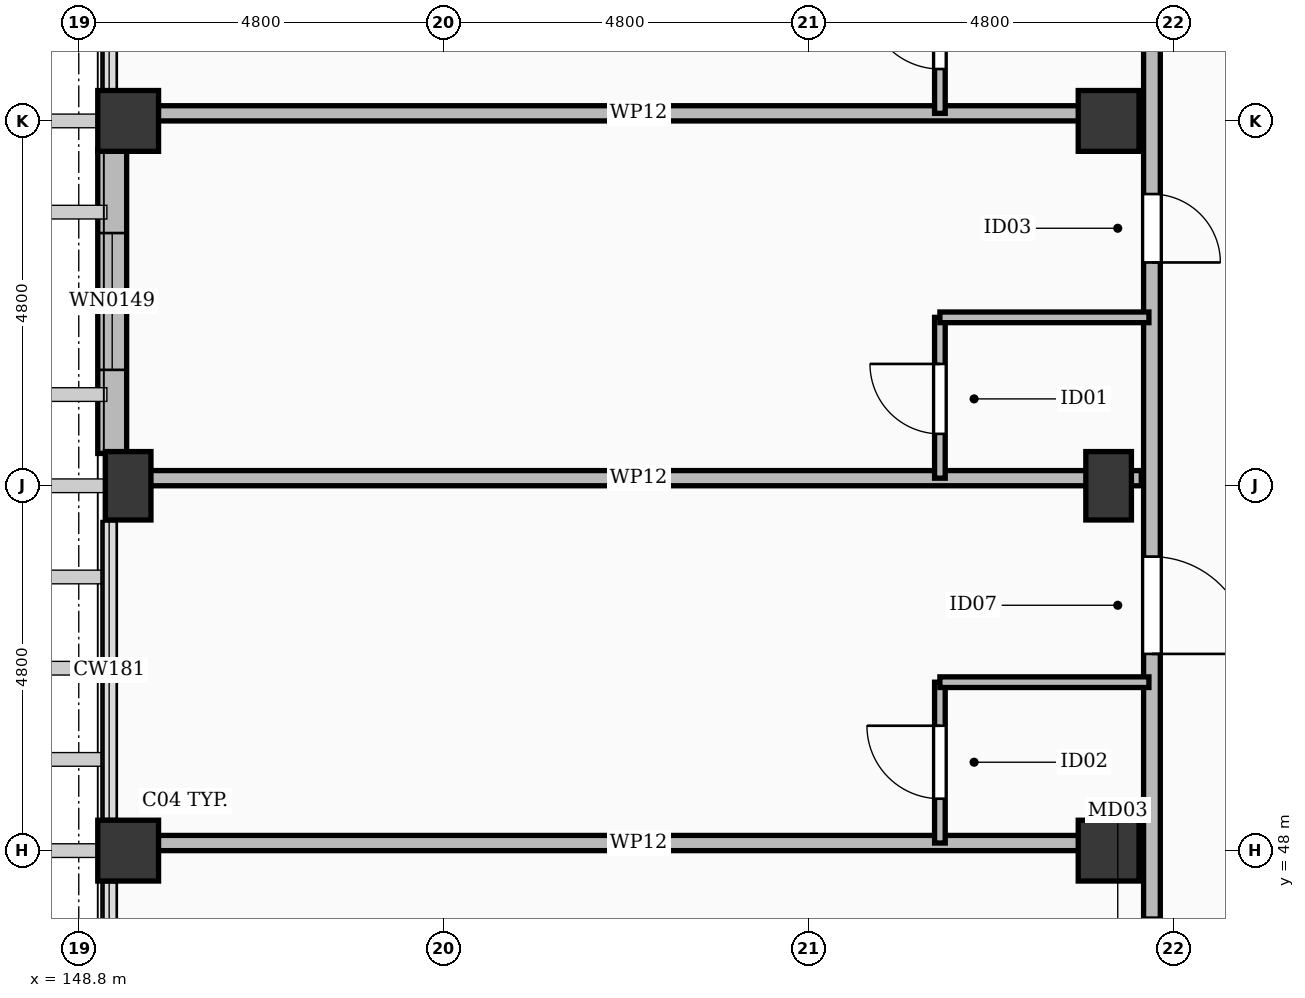
"""IFC4 building model, lengths in metres.
Left out: names, types, materials, properties, quantities, classifications, styles, units other than length and angle.
Written with IfcOpenShell. Run it as: python <this file> out.ifc"""

import sys

from ifc_helpers import new_model, si_unit, direction, frame, frame_2d, origin, origin_2d, place, context, subcontext, project, spatial, rectangle, extrude, element, fill, save


model = new_model("IFC4")
c1 = context("Model", 3, precision=1e-05, world=origin(), true_north=direction((0.0, 1.0)))
c2 = subcontext(c1, "Body", "Model", "MODEL_VIEW")
j1 = project(units=[si_unit("LENGTHUNIT", "METRE"), si_unit("PLANEANGLEUNIT", "RADIAN")], contexts=[c1])
p1 = place(None, origin())
s1 = spatial("IfcSite", under=j1, at=p1, CompositionType="ELEMENT")
p2 = place(p1, origin())
s2 = spatial("IfcBuilding", under=s1, at=p2, CompositionType="ELEMENT")
p3 = place(p2, frame((0.0, 0.0, 21.0)))
s3 = spatial("IfcBuildingStorey", under=s2, at=p3, CompositionType="ELEMENT", Elevation=21.0)
for number, where, z_axis, x_axis in (
    (1, (149.45, 48.0, 0.0), (0.0, 0.0, 1.0), (1.0, 0.0, 0.0)),
    (2, (149.45, 57.6, 0.0), (0.0, 0.0, 1.0), (1.0, 0.0, 0.0)),
    (3, (162.35, 48.0, 0.0), (0.0, 0.0, 1.0), (1.0, 0.0, 0.0)),
    (4, (162.35, 57.6, 0.0), (0.0, 0.0, 1.0), (1.0, 0.0, 0.0)),
):
    element("IfcColumn", number, at=place(p3, frame(where, z_axis=z_axis, x_axis=x_axis)), inside=s3, PredefinedType="COLUMN", context=c2, shape_type="SweptSolid", body=[
        extrude(rectangle(XDim=0.8, YDim=0.8, at=origin_2d()), origin(), (0.0, 0.0, 1.0), 3.6),
    ])
for number, where, z_axis, x_axis in (
    (5, (149.45, 52.8, -0.26), (0.0, 0.0, 1.0), (1.0, 0.0, 0.0)),
    (6, (162.35, 52.8, -0.26), (0.0, 0.0, 1.0), (1.0, 0.0, 0.0)),
):
    element("IfcColumn", number, at=place(p3, frame(where, z_axis=z_axis, x_axis=x_axis)), inside=s3, PredefinedType="COLUMN", context=c2, shape_type="SweptSolid", body=[
        extrude(rectangle(XDim=0.6, YDim=0.9, at=origin_2d()), origin(), (0.0, 0.0, 1.0), 3.86),
    ])
p4 = place(p3, frame((149.24, 53.225, 0.0), z_axis=(0.0, 0.0, 1.0), x_axis=(0.0, 1.0, 0.0)))
e7 = element("IfcWall", 7, at=p4, inside=s3, PredefinedType="SOLIDWALL", context=c2, shape_type="SweptSolid", body=[
    extrude(rectangle(XDim=4.0, YDim=0.38, at=frame_2d((2.0, 0.0))), origin(), (0.0, 0.0, 1.0), 2.652),
])
p5 = place(p4, frame((1.1, 0.0, 0.55)))
e8 = element("IfcOpeningElement", 8, at=p5, cuts=e7, PredefinedType="OPENING", context=c2, shape_type="SweptSolid", body=[
    extrude(rectangle(XDim=1.8, YDim=1.76, at=frame_2d((0.9, 0.88))), frame((0.0, 0.202, 0.0), z_axis=(0.0, -1.0, 0.0), x_axis=(1.0, 0.0, 0.0)), (0.0, 0.0, 1.0), 0.404),
])
p6 = place(p3, frame((162.92, 19.55, 0.0), z_axis=(0.0, 0.0, 1.0), x_axis=(0.0, 1.0, 0.0)))
e9 = element("IfcWall", 9, at=p6, inside=s3, PredefinedType="PARTITIONING", context=c2, shape_type="SweptSolid", body=[
    extrude(rectangle(XDim=53.65, YDim=0.22, at=frame_2d((26.825, 0.0))), origin(), (0.0, 0.0, 1.0), 2.652),
])
p7 = place(p6, frame((5.15, 0.0, 0.0)))
e10 = element("IfcOpeningElement", 10, at=p7, cuts=e9, PredefinedType="OPENING", context=c2, shape_type="SweptSolid", body=[
    extrude(rectangle(XDim=1.5, YDim=2.3, at=frame_2d((0.75, 1.15))), frame((0.0, 0.122, 0.0), z_axis=(0.0, -1.0, 0.0), x_axis=(1.0, 0.0, 0.0)), (0.0, 0.0, 1.0), 0.244),
])
p8 = place(p6, frame((12.188, 0.0, 0.0)))
e11 = element("IfcOpeningElement", 11, at=p8, cuts=e9, PredefinedType="OPENING", context=c2, shape_type="SweptSolid", body=[
    extrude(rectangle(XDim=1.05, YDim=2.22, at=frame_2d((0.525, 1.11))), frame((0.0, 0.122, 0.0), z_axis=(0.0, -1.0, 0.0), x_axis=(1.0, 0.0, 0.0)), (0.0, 0.0, 1.0), 0.244),
])
p9 = place(p6, frame((16.988, 0.0, 0.0)))
e12 = element("IfcOpeningElement", 12, at=p9, cuts=e9, PredefinedType="OPENING", context=c2, shape_type="SweptSolid", body=[
    extrude(rectangle(XDim=1.02, YDim=2.2, at=frame_2d((0.51, 1.1))), frame((0.0, 0.122, 0.0), z_axis=(0.0, -1.0, 0.0), x_axis=(1.0, 0.0, 0.0)), (0.0, 0.0, 1.0), 0.244),
])
p10 = place(p6, frame((21.788, 0.0, 0.0)))
e13 = element("IfcOpeningElement", 13, at=p10, cuts=e9, PredefinedType="OPENING", context=c2, shape_type="SweptSolid", body=[
    extrude(rectangle(XDim=1.14, YDim=2.26, at=frame_2d((0.57, 1.13))), frame((0.0, 0.122, 0.0), z_axis=(0.0, -1.0, 0.0), x_axis=(1.0, 0.0, 0.0)), (0.0, 0.0, 1.0), 0.244),
])
p11 = place(p6, frame((26.588, 0.0, 0.0)))
e14 = element("IfcOpeningElement", 14, at=p11, cuts=e9, PredefinedType="OPENING", context=c2, shape_type="SweptSolid", body=[
    extrude(rectangle(XDim=0.98, YDim=2.15, at=frame_2d((0.49, 1.075))), frame((0.0, 0.122, 0.0), z_axis=(0.0, -1.0, 0.0), x_axis=(1.0, 0.0, 0.0)), (0.0, 0.0, 1.0), 0.244),
])
p12 = place(p6, frame((31.038, 0.0, 0.0)))
e15 = element("IfcOpeningElement", 15, at=p12, cuts=e9, PredefinedType="OPENING", context=c2, shape_type="SweptSolid", body=[
    extrude(rectangle(XDim=1.28, YDim=2.16, at=frame_2d((0.64, 1.08))), frame((0.0, 0.122, 0.0), z_axis=(0.0, -1.0, 0.0), x_axis=(1.0, 0.0, 0.0)), (0.0, 0.0, 1.0), 0.244),
])
p13 = place(p6, frame((36.188, 0.0, 0.0)))
e16 = element("IfcOpeningElement", 16, at=p13, cuts=e9, PredefinedType="OPENING", context=c2, shape_type="SweptSolid", body=[
    extrude(rectangle(XDim=0.9, YDim=2.08, at=frame_2d((0.45, 1.04))), frame((0.0, 0.122, 0.0), z_axis=(0.0, -1.0, 0.0), x_axis=(1.0, 0.0, 0.0)), (0.0, 0.0, 1.0), 0.244),
])
p14 = place(p6, frame((40.988, 0.0, 0.0)))
e17 = element("IfcOpeningElement", 17, at=p14, cuts=e9, PredefinedType="OPENING", context=c2, shape_type="SweptSolid", body=[
    extrude(rectangle(XDim=1.05, YDim=2.22, at=frame_2d((0.525, 1.11))), frame((0.0, 0.122, 0.0), z_axis=(0.0, -1.0, 0.0), x_axis=(1.0, 0.0, 0.0)), (0.0, 0.0, 1.0), 0.244),
])
p15 = place(p6, frame((45.788, 0.0, 0.0)))
e18 = element("IfcOpeningElement", 18, at=p15, cuts=e9, PredefinedType="OPENING", context=c2, shape_type="SweptSolid", body=[
    extrude(rectangle(XDim=1.02, YDim=2.2, at=frame_2d((0.51, 1.1))), frame((0.0, 0.122, 0.0), z_axis=(0.0, -1.0, 0.0), x_axis=(1.0, 0.0, 0.0)), (0.0, 0.0, 1.0), 0.244),
])
p16 = place(p6, frame((50.588, 0.0, 0.0)))
e19 = element("IfcOpeningElement", 19, at=p16, cuts=e9, PredefinedType="OPENING", context=c2, shape_type="SweptSolid", body=[
    extrude(rectangle(XDim=1.14, YDim=2.26, at=frame_2d((0.57, 1.13))), frame((0.0, 0.122, 0.0), z_axis=(0.0, -1.0, 0.0), x_axis=(1.0, 0.0, 0.0)), (0.0, 0.0, 1.0), 0.244),
])
p17 = place(p3, frame((149.55, 48.1, 0.0), z_axis=(0.0, 0.0, 1.0), x_axis=(1.0, 0.0, 0.0)))
e20 = element("IfcWall", 20, at=p17, inside=s3, PredefinedType="PARTITIONING", context=c2, shape_type="SweptSolid", body=[
    extrude(rectangle(XDim=13.23, YDim=0.2, at=frame_2d((6.615, 0.0))), origin(), (0.0, 0.0, 1.0), 2.652),
])
p18 = place(p3, frame((160.13, 48.1, 0.0), z_axis=(0.0, 0.0, 1.0), x_axis=(0.0, 1.0, 0.0)))
e21 = element("IfcWall", 21, at=p18, inside=s3, PredefinedType="PARTITIONING", context=c2, shape_type="SweptSolid", body=[
    extrude(rectangle(XDim=2.116, YDim=0.14, at=frame_2d((1.058, 0.0))), origin(), (0.0, 0.0, 1.0), 2.652),
])
p19 = place(p18, frame((0.583, 0.0, 0.0)))
e22 = element("IfcOpeningElement", 22, at=p19, cuts=e21, PredefinedType="OPENING", context=c2, shape_type="SweptSolid", body=[
    extrude(rectangle(XDim=0.96, YDim=2.12, at=frame_2d((0.48, 1.06))), frame((0.0, 0.082, 0.0), z_axis=(0.0, -1.0, 0.0), x_axis=(1.0, 0.0, 0.0)), (0.0, 0.0, 1.0), 0.164),
])
p20 = place(p3, frame((160.13, 50.216, 0.0), z_axis=(0.0, 0.0, 1.0), x_axis=(1.0, 0.0, 0.0)))
e23 = element("IfcWall", 23, at=p20, inside=s3, PredefinedType="PARTITIONING", context=c2, shape_type="SweptSolid", body=[
    extrude(rectangle(XDim=2.75, YDim=0.14, at=frame_2d((1.375, 0.0))), origin(), (0.0, 0.0, 1.0), 2.652),
])
p21 = place(p3, frame((149.55, 52.9, 0.0), z_axis=(0.0, 0.0, 1.0), x_axis=(1.0, 0.0, 0.0)))
e24 = element("IfcWall", 24, at=p21, inside=s3, PredefinedType="PARTITIONING", context=c2, shape_type="SweptSolid", body=[
    extrude(rectangle(XDim=13.23, YDim=0.2, at=frame_2d((6.615, 0.0))), origin(), (0.0, 0.0, 1.0), 2.652),
])
p22 = place(p3, frame((160.13, 52.9, 0.0), z_axis=(0.0, 0.0, 1.0), x_axis=(0.0, 1.0, 0.0)))
e25 = element("IfcWall", 25, at=p22, inside=s3, PredefinedType="PARTITIONING", context=c2, shape_type="SweptSolid", body=[
    extrude(rectangle(XDim=2.116, YDim=0.14, at=frame_2d((1.058, 0.0))), origin(), (0.0, 0.0, 1.0), 2.652),
])
p23 = place(p22, frame((0.583, 0.0, 0.0)))
e26 = element("IfcOpeningElement", 26, at=p23, cuts=e25, PredefinedType="OPENING", context=c2, shape_type="SweptSolid", body=[
    extrude(rectangle(XDim=0.92, YDim=2.1, at=frame_2d((0.46, 1.05))), frame((0.0, 0.082, 0.0), z_axis=(0.0, -1.0, 0.0), x_axis=(1.0, 0.0, 0.0)), (0.0, 0.0, 1.0), 0.164),
])
p24 = place(p3, frame((160.13, 55.016, 0.0), z_axis=(0.0, 0.0, 1.0), x_axis=(1.0, 0.0, 0.0)))
e27 = element("IfcWall", 27, at=p24, inside=s3, PredefinedType="PARTITIONING", context=c2, shape_type="SweptSolid", body=[
    extrude(rectangle(XDim=2.75, YDim=0.14, at=frame_2d((1.375, 0.0))), origin(), (0.0, 0.0, 1.0), 2.652),
])
p25 = place(p3, frame((149.55, 57.7, 0.0), z_axis=(0.0, 0.0, 1.0), x_axis=(1.0, 0.0, 0.0)))
e28 = element("IfcWall", 28, at=p25, inside=s3, PredefinedType="PARTITIONING", context=c2, shape_type="SweptSolid", body=[
    extrude(rectangle(XDim=13.23, YDim=0.2, at=frame_2d((6.615, 0.0))), origin(), (0.0, 0.0, 1.0), 2.652),
])
p26 = place(p3, frame((160.13, 57.7, 0.0), z_axis=(0.0, 0.0, 1.0), x_axis=(0.0, 1.0, 0.0)))
e29 = element("IfcWall", 29, at=p26, inside=s3, PredefinedType="PARTITIONING", context=c2, shape_type="SweptSolid", body=[
    extrude(rectangle(XDim=2.116, YDim=0.14, at=frame_2d((1.058, 0.0))), origin(), (0.0, 0.0, 1.0), 2.652),
])
p27 = place(p26, frame((0.583, 0.0, 0.0)))
e30 = element("IfcOpeningElement", 30, at=p27, cuts=e29, PredefinedType="OPENING", context=c2, shape_type="SweptSolid", body=[
    extrude(rectangle(XDim=0.96, YDim=2.12, at=frame_2d((0.48, 1.06))), frame((0.0, 0.082, 0.0), z_axis=(0.0, -1.0, 0.0), x_axis=(1.0, 0.0, 0.0)), (0.0, 0.0, 1.0), 0.164),
])
p28 = place(p5, origin())
e31 = element("IfcWindow", 31, at=p28, inside=s3, PartitioningType="SINGLE_PANEL", PredefinedType="WINDOW", context=c2, shape_type="SweptSolid", body=[
    extrude(rectangle(XDim=1.8, YDim=1.76, at=frame_2d((0.9, 0.88))), frame((0.0, 0.03, 0.0), z_axis=(0.0, -1.0, 0.0), x_axis=(1.0, 0.0, 0.0)), (0.0, 0.0, 1.0), 0.06),
])
fill(e8, e31)
p29 = place(p11, frame((0.98, 0.0, 0.0), z_axis=(0.0, 0.0, 1.0), x_axis=(-1.0, 0.0, 0.0)))
e32 = element("IfcDoor", 32, at=p29, inside=s3, OperationType="SINGLE_SWING_LEFT", PredefinedType="DOOR", context=c2, shape_type="SweptSolid", body=[
    extrude(rectangle(XDim=0.98, YDim=2.15, at=frame_2d((0.49, 1.075))), frame((0.0, 0.025, 0.0), z_axis=(0.0, -1.0, 0.0), x_axis=(1.0, 0.0, 0.0)), (0.0, 0.0, 1.0), 0.05),
])
fill(e14, e32)
p30 = place(p12, frame((1.28, 0.0, 0.0), z_axis=(0.0, 0.0, 1.0), x_axis=(-1.0, 0.0, 0.0)))
e33 = element("IfcDoor", 33, at=p30, inside=s3, OperationType="SINGLE_SWING_LEFT", PredefinedType="DOOR", context=c2, shape_type="SweptSolid", body=[
    extrude(rectangle(XDim=1.28, YDim=2.16, at=frame_2d((0.64, 1.08))), frame((0.0, 0.025, 0.0), z_axis=(0.0, -1.0, 0.0), x_axis=(1.0, 0.0, 0.0)), (0.0, 0.0, 1.0), 0.05),
])
fill(e15, e33)
p31 = place(p19, origin())
e34 = element("IfcDoor", 34, at=p31, inside=s3, OperationType="SINGLE_SWING_RIGHT", PredefinedType="DOOR", context=c2, shape_type="SweptSolid", body=[
    extrude(rectangle(XDim=0.96, YDim=2.12, at=frame_2d((0.48, 1.06))), frame((0.0, 0.025, 0.0), z_axis=(0.0, -1.0, 0.0), x_axis=(1.0, 0.0, 0.0)), (0.0, 0.0, 1.0), 0.05),
])
fill(e22, e34)
p32 = place(p13, frame((0.9, 0.0, 0.0), z_axis=(0.0, 0.0, 1.0), x_axis=(-1.0, 0.0, 0.0)))
e35 = element("IfcDoor", 35, at=p32, inside=s3, OperationType="SINGLE_SWING_LEFT", PredefinedType="DOOR", context=c2, shape_type="SweptSolid", body=[
    extrude(rectangle(XDim=0.9, YDim=2.08, at=frame_2d((0.45, 1.04))), frame((0.0, 0.025, 0.0), z_axis=(0.0, -1.0, 0.0), x_axis=(1.0, 0.0, 0.0)), (0.0, 0.0, 1.0), 0.05),
])
fill(e16, e35)
p33 = place(p23, origin())
e36 = element("IfcDoor", 36, at=p33, inside=s3, OperationType="SINGLE_SWING_RIGHT", PredefinedType="DOOR", context=c2, shape_type="SweptSolid", body=[
    extrude(rectangle(XDim=0.92, YDim=2.1, at=frame_2d((0.46, 1.05))), frame((0.0, 0.025, 0.0), z_axis=(0.0, -1.0, 0.0), x_axis=(1.0, 0.0, 0.0)), (0.0, 0.0, 1.0), 0.05),
])
fill(e26, e36)
p34 = place(p27, origin())
e37 = element("IfcDoor", 37, at=p34, inside=s3, OperationType="SINGLE_SWING_RIGHT", PredefinedType="DOOR", context=c2, shape_type="SweptSolid", body=[
    extrude(rectangle(XDim=0.96, YDim=2.12, at=frame_2d((0.48, 1.06))), frame((0.0, 0.025, 0.0), z_axis=(0.0, -1.0, 0.0), x_axis=(1.0, 0.0, 0.0)), (0.0, 0.0, 1.0), 0.05),
])
fill(e30, e37)
save(model, sys.argv[1])
